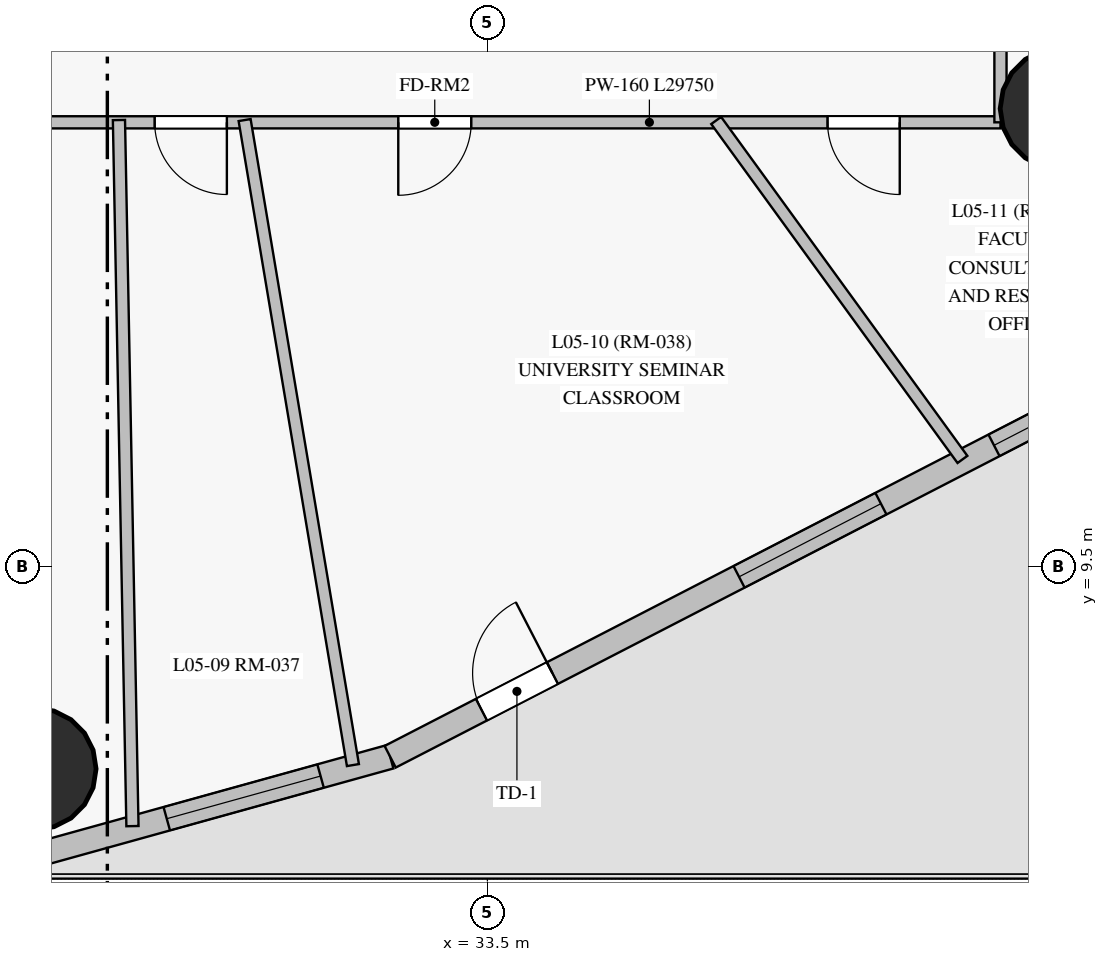
"""IFC4 building model, lengths in metres.
Left out: names, types, materials, properties, quantities, classifications, styles, units other than length and angle.
Written with IfcOpenShell. Run it as: python <this file> out.ifc"""

import sys

from ifc_helpers import new_model, si_unit, direction, frame, frame_2d, origin, origin_with_axes, origin_2d, place, context, subcontext, project, spatial, rectangle, circle, extrude, source, transform, mapped, element, fill, save


model = new_model("IFC4")
c1 = context("Model", 3, precision=1e-05, world=origin(), true_north=direction((0.0, 1.0)))
c2 = subcontext(c1, "Body", "Model", "MODEL_VIEW")
j1 = project(units=[si_unit("LENGTHUNIT", "METRE"), si_unit("PLANEANGLEUNIT", "RADIAN")], contexts=[c1])
p1 = place(None, origin())
s1 = spatial("IfcSite", under=j1, at=p1, CompositionType="ELEMENT")
p2 = place(p1, origin())
s2 = spatial("IfcBuilding", under=s1, at=p2, CompositionType="ELEMENT")
p3 = place(p2, frame((0.0, 0.0, 22.5)))
s3 = spatial("IfcBuildingStorey", under=s2, at=p3, CompositionType="ELEMENT", Elevation=22.5)
m1 = source(origin_with_axes(), c2, "Body", "SweptSolid", [
    extrude(circle(Radius=0.8, at=origin_2d()), origin(), (0.0, 0.0, 1.0), 4.0),
])
for number, where, z_axis, x_axis in (
    (1, (27.552, 6.844, 0.0), (0.0, 0.0, 1.0), (1.0, 0.0, 0.0)),
    (2, (41.046, 15.53, 0.0), (0.0, 0.0, 1.0), (1.0, 0.0, 0.0)),
):
    element("IfcColumn", number, at=place(p3, frame(where, z_axis=z_axis, x_axis=x_axis)), inside=s3, PredefinedType="COLUMN", context=c2, shape_type="MappedRepresentation", body=[
        mapped(m1, transform((0.0, 0.0, 0.0), scale=1.0)),
    ])
p4 = place(p3, frame((16.622, 2.676, 0.0), z_axis=(0.0, 0.0, 1.0), x_axis=(0.963606446226, 0.267324927367, 0.0)))
e3 = element("IfcWall", 3, at=p4, inside=s3, PredefinedType="SOLIDWALL", context=c2, shape_type="SweptSolid", body=[
    extrude(rectangle(XDim=16.188, YDim=0.32, at=frame_2d((8.094, 0.0))), origin(), (0.0, 0.0, 1.0), 3.75),
])
p5 = place(p4, frame((0.587, 0.0, 0.85)))
e4 = element("IfcOpeningElement", 4, at=p5, cuts=e3, PredefinedType="OPENING", context=c2, shape_type="SweptSolid", body=[
    extrude(rectangle(XDim=1.8, YDim=1.85, at=frame_2d((0.9, 0.925))), frame((0.0, 0.17, 0.0), z_axis=(0.0, -1.0, 0.0), x_axis=(1.0, 0.0, 0.0)), (0.0, 0.0, 1.0), 0.34),
])
p6 = place(p4, frame((4.012, 0.0, 0.85)))
e5 = element("IfcOpeningElement", 5, at=p6, cuts=e3, PredefinedType="OPENING", context=c2, shape_type="SweptSolid", body=[
    extrude(rectangle(XDim=2.1, YDim=1.95, at=frame_2d((1.05, 0.975))), frame((0.0, 0.17, 0.0), z_axis=(0.0, -1.0, 0.0), x_axis=(1.0, 0.0, 0.0)), (0.0, 0.0, 1.0), 0.34),
])
p7 = place(p4, frame((7.668, 0.0, 0.85)))
e6 = element("IfcOpeningElement", 6, at=p7, cuts=e3, PredefinedType="OPENING", context=c2, shape_type="SweptSolid", body=[
    extrude(rectangle(XDim=2.1, YDim=1.95, at=frame_2d((1.05, 0.975))), frame((0.0, 0.17, 0.0), z_axis=(0.0, -1.0, 0.0), x_axis=(1.0, 0.0, 0.0)), (0.0, 0.0, 1.0), 0.34),
])
p8 = place(p4, frame((13.138, 0.0, 0.85)))
e7 = element("IfcOpeningElement", 7, at=p8, cuts=e3, PredefinedType="OPENING", context=c2, shape_type="SweptSolid", body=[
    extrude(rectangle(XDim=2.1, YDim=1.95, at=frame_2d((1.05, 0.975))), frame((0.0, 0.17, 0.0), z_axis=(0.0, -1.0, 0.0), x_axis=(1.0, 0.0, 0.0)), (0.0, 0.0, 1.0), 0.34),
])
p9 = place(p3, frame((32.221, 7.003, 0.0), z_axis=(0.0, 0.0, 1.0), x_axis=(0.888779978747, 0.458334102352, 0.0)))
e8 = element("IfcWall", 8, at=p9, inside=s3, PredefinedType="SOLIDWALL", context=c2, shape_type="SweptSolid", body=[
    extrude(rectangle(XDim=11.258, YDim=0.32, at=frame_2d((5.629, 0.0))), origin(), (0.0, 0.0, 1.0), 3.75),
])
p10 = place(p9, frame((5.164, 0.0, 0.85)))
e9 = element("IfcOpeningElement", 9, at=p10, cuts=e8, PredefinedType="OPENING", context=c2, shape_type="SweptSolid", body=[
    extrude(rectangle(XDim=2.1, YDim=1.95, at=frame_2d((1.05, 0.975))), frame((0.0, 0.17, 0.0), z_axis=(0.0, -1.0, 0.0), x_axis=(1.0, 0.0, 0.0)), (0.0, 0.0, 1.0), 0.34),
])
p11 = place(p9, frame((8.938, 0.0, 0.85)))
e10 = element("IfcOpeningElement", 10, at=p11, cuts=e8, PredefinedType="OPENING", context=c2, shape_type="SweptSolid", body=[
    extrude(rectangle(XDim=1.8, YDim=1.85, at=frame_2d((0.9, 0.925))), frame((0.0, 0.17, 0.0), z_axis=(0.0, -1.0, 0.0), x_axis=(1.0, 0.0, 0.0)), (0.0, 0.0, 1.0), 0.34),
])
p12 = place(p9, frame((1.351, 0.0, 0.0)))
e11 = element("IfcOpeningElement", 11, at=p12, cuts=e8, PredefinedType="OPENING", context=c2, shape_type="SweptSolid", body=[
    extrude(rectangle(XDim=1.05, YDim=2.12, at=frame_2d((0.525, 1.06))), frame((0.0, 0.17, 0.0), z_axis=(0.0, -1.0, 0.0), x_axis=(1.0, 0.0, 0.0)), (0.0, 0.0, 1.0), 0.34),
])
p13 = place(p3, frame((40.25, 15.35, 0.0), z_axis=(0.0, 0.0, 1.0), x_axis=(-1.0, 0.0, 0.0)))
e12 = element("IfcWall", 12, at=p13, inside=s3, PredefinedType="PARTITIONING", context=c2, shape_type="SweptSolid", body=[
    extrude(rectangle(XDim=29.75, YDim=0.16, at=frame_2d((14.875, 0.0))), origin(), (0.0, 0.0, 1.0), 3.1),
])
p14 = place(p13, frame((26.803, 0.0, 0.0)))
e13 = element("IfcOpeningElement", 13, at=p14, cuts=e12, PredefinedType="OPENING", context=c2, shape_type="SweptSolid", body=[
    extrude(rectangle(XDim=0.95, YDim=2.15, at=frame_2d((0.475, 1.075))), frame((0.0, 0.09, 0.0), z_axis=(0.0, -1.0, 0.0), x_axis=(1.0, 0.0, 0.0)), (0.0, 0.0, 1.0), 0.18),
])
p15 = place(p13, frame((23.18, 0.0, 0.0)))
e14 = element("IfcOpeningElement", 14, at=p15, cuts=e12, PredefinedType="OPENING", context=c2, shape_type="SweptSolid", body=[
    extrude(rectangle(XDim=0.95, YDim=2.15, at=frame_2d((0.475, 1.075))), frame((0.0, 0.09, 0.0), z_axis=(0.0, -1.0, 0.0), x_axis=(1.0, 0.0, 0.0)), (0.0, 0.0, 1.0), 0.18),
])
p16 = place(p13, frame((21.097, 0.0, 0.0)))
e15 = element("IfcOpeningElement", 15, at=p16, cuts=e12, PredefinedType="OPENING", context=c2, shape_type="SweptSolid", body=[
    extrude(rectangle(XDim=0.95, YDim=2.15, at=frame_2d((0.475, 1.075))), frame((0.0, 0.09, 0.0), z_axis=(0.0, -1.0, 0.0), x_axis=(1.0, 0.0, 0.0)), (0.0, 0.0, 1.0), 0.18),
])
p17 = place(p13, frame((18.772, 0.0, 0.0)))
e16 = element("IfcOpeningElement", 16, at=p17, cuts=e12, PredefinedType="OPENING", context=c2, shape_type="SweptSolid", body=[
    extrude(rectangle(XDim=0.95, YDim=2.15, at=frame_2d((0.475, 1.075))), frame((0.0, 0.09, 0.0), z_axis=(0.0, -1.0, 0.0), x_axis=(1.0, 0.0, 0.0)), (0.0, 0.0, 1.0), 0.18),
])
p18 = place(p13, frame((16.558, 0.0, 0.0)))
e17 = element("IfcOpeningElement", 17, at=p18, cuts=e12, PredefinedType="OPENING", context=c2, shape_type="SweptSolid", body=[
    extrude(rectangle(XDim=0.86, YDim=2.1, at=frame_2d((0.43, 1.05))), frame((0.0, 0.09, 0.0), z_axis=(0.0, -1.0, 0.0), x_axis=(1.0, 0.0, 0.0)), (0.0, 0.0, 1.0), 0.18),
])
p19 = place(p13, frame((14.4, 0.0, 0.0)))
e18 = element("IfcOpeningElement", 18, at=p19, cuts=e12, PredefinedType="OPENING", context=c2, shape_type="SweptSolid", body=[
    extrude(rectangle(XDim=0.95, YDim=2.15, at=frame_2d((0.475, 1.075))), frame((0.0, 0.09, 0.0), z_axis=(0.0, -1.0, 0.0), x_axis=(1.0, 0.0, 0.0)), (0.0, 0.0, 1.0), 0.18),
])
p20 = place(p13, frame((10.177, 0.0, 0.0)))
e19 = element("IfcOpeningElement", 19, at=p20, cuts=e12, PredefinedType="OPENING", context=c2, shape_type="SweptSolid", body=[
    extrude(rectangle(XDim=0.95, YDim=2.15, at=frame_2d((0.475, 1.075))), frame((0.0, 0.09, 0.0), z_axis=(0.0, -1.0, 0.0), x_axis=(1.0, 0.0, 0.0)), (0.0, 0.0, 1.0), 0.18),
])
p21 = place(p13, frame((6.962, 0.0, 0.0)))
e20 = element("IfcOpeningElement", 20, at=p21, cuts=e12, PredefinedType="OPENING", context=c2, shape_type="SweptSolid", body=[
    extrude(rectangle(XDim=0.96, YDim=2.15, at=frame_2d((0.48, 1.075))), frame((0.0, 0.09, 0.0), z_axis=(0.0, -1.0, 0.0), x_axis=(1.0, 0.0, 0.0)), (0.0, 0.0, 1.0), 0.18),
])
p22 = place(p13, frame((1.325, 0.0, 0.0)))
e21 = element("IfcOpeningElement", 21, at=p22, cuts=e12, PredefinedType="OPENING", context=c2, shape_type="SweptSolid", body=[
    extrude(rectangle(XDim=0.95, YDim=2.15, at=frame_2d((0.475, 1.075))), frame((0.0, 0.09, 0.0), z_axis=(0.0, -1.0, 0.0), x_axis=(1.0, 0.0, 0.0)), (0.0, 0.0, 1.0), 0.18),
])
p23 = place(p3, frame((40.25, 37.65, 0.0), z_axis=(0.0, 0.0, 1.0), x_axis=(0.0, -1.0, 0.0)))
e22 = element("IfcWall", 22, at=p23, inside=s3, PredefinedType="PARTITIONING", context=c2, shape_type="SweptSolid", body=[
    extrude(rectangle(XDim=22.3, YDim=0.16, at=frame_2d((11.15, 0.0))), origin(), (0.0, 0.0, 1.0), 3.15),
])
p24 = place(p23, frame((16.25, 0.0, 0.0)))
e23 = element("IfcOpeningElement", 23, at=p24, cuts=e22, PredefinedType="OPENING", context=c2, shape_type="SweptSolid", body=[
    extrude(rectangle(XDim=0.95, YDim=2.15, at=frame_2d((0.475, 1.075))), frame((0.0, 0.09, 0.0), z_axis=(0.0, -1.0, 0.0), x_axis=(1.0, 0.0, 0.0)), (0.0, 0.0, 1.0), 0.18),
])
p25 = place(p23, frame((14.06, 0.0, 0.0)))
e24 = element("IfcOpeningElement", 24, at=p25, cuts=e22, PredefinedType="OPENING", context=c2, shape_type="SweptSolid", body=[
    extrude(rectangle(XDim=0.96, YDim=2.15, at=frame_2d((0.48, 1.075))), frame((0.0, 0.09, 0.0), z_axis=(0.0, -1.0, 0.0), x_axis=(1.0, 0.0, 0.0)), (0.0, 0.0, 1.0), 0.18),
])
p26 = place(p23, frame((12.235, 0.0, 0.0)))
e25 = element("IfcOpeningElement", 25, at=p26, cuts=e22, PredefinedType="OPENING", context=c2, shape_type="SweptSolid", body=[
    extrude(rectangle(XDim=0.95, YDim=2.15, at=frame_2d((0.475, 1.075))), frame((0.0, 0.09, 0.0), z_axis=(0.0, -1.0, 0.0), x_axis=(1.0, 0.0, 0.0)), (0.0, 0.0, 1.0), 0.18),
])
p27 = place(p23, frame((4.385, 0.0, 0.0)))
e26 = element("IfcOpeningElement", 26, at=p27, cuts=e22, PredefinedType="OPENING", context=c2, shape_type="SweptSolid", body=[
    extrude(rectangle(XDim=0.95, YDim=2.15, at=frame_2d((0.475, 1.075))), frame((0.0, 0.09, 0.0), z_axis=(0.0, -1.0, 0.0), x_axis=(1.0, 0.0, 0.0)), (0.0, 0.0, 1.0), 0.18),
])
p28 = place(p23, frame((2.19, 0.0, 0.0)))
e27 = element("IfcOpeningElement", 27, at=p28, cuts=e22, PredefinedType="OPENING", context=c2, shape_type="SweptSolid", body=[
    extrude(rectangle(XDim=0.95, YDim=2.15, at=frame_2d((0.475, 1.075))), frame((0.0, 0.09, 0.0), z_axis=(0.0, -1.0, 0.0), x_axis=(1.0, 0.0, 0.0)), (0.0, 0.0, 1.0), 0.18),
])
p29 = place(p23, frame((17.358, 0.0, 0.0)))
e28 = element("IfcOpeningElement", 28, at=p29, cuts=e22, PredefinedType="OPENING", context=c2, shape_type="SweptSolid", body=[
    extrude(rectangle(XDim=0.95, YDim=2.15, at=frame_2d((0.475, 1.075))), frame((0.0, 0.09, 0.0), z_axis=(0.0, -1.0, 0.0), x_axis=(1.0, 0.0, 0.0)), (0.0, 0.0, 1.0), 0.18),
])
p30 = place(p23, frame((18.489, 0.0, 0.0)))
e29 = element("IfcOpeningElement", 29, at=p30, cuts=e22, PredefinedType="OPENING", context=c2, shape_type="SweptSolid", body=[
    extrude(rectangle(XDim=0.95, YDim=2.15, at=frame_2d((0.475, 1.075))), frame((0.0, 0.09, 0.0), z_axis=(0.0, -1.0, 0.0), x_axis=(1.0, 0.0, 0.0)), (0.0, 0.0, 1.0), 0.18),
])
p31 = place(p23, frame((10.61, 0.0, 0.0)))
e30 = element("IfcOpeningElement", 30, at=p31, cuts=e22, PredefinedType="OPENING", context=c2, shape_type="SweptSolid", body=[
    extrude(rectangle(XDim=0.86, YDim=2.04, at=frame_2d((0.43, 1.02))), frame((0.0, 0.09, 0.0), z_axis=(0.0, -1.0, 0.0), x_axis=(1.0, 0.0, 0.0)), (0.0, 0.0, 1.0), 0.18),
])
p32 = place(p23, frame((8.378, 0.0, 0.0)))
e31 = element("IfcOpeningElement", 31, at=p32, cuts=e22, PredefinedType="OPENING", context=c2, shape_type="SweptSolid", body=[
    extrude(rectangle(XDim=0.86, YDim=2.04, at=frame_2d((0.43, 1.02))), frame((0.0, 0.09, 0.0), z_axis=(0.0, -1.0, 0.0), x_axis=(1.0, 0.0, 0.0)), (0.0, 0.0, 1.0), 0.18),
])
p33 = place(p23, frame((7.144, 0.0, 0.0)))
e32 = element("IfcOpeningElement", 32, at=p33, cuts=e22, PredefinedType="OPENING", context=c2, shape_type="SweptSolid", body=[
    extrude(rectangle(XDim=0.86, YDim=2.04, at=frame_2d((0.43, 1.02))), frame((0.0, 0.09, 0.0), z_axis=(0.0, -1.0, 0.0), x_axis=(1.0, 0.0, 0.0)), (0.0, 0.0, 1.0), 0.18),
])
p34 = place(p3, frame((28.653, 15.38, 0.0), z_axis=(0.0, 0.0, 1.0), x_axis=(0.019130224358, -0.999817000514, 0.0)))
e33 = element("IfcWall", 33, at=p34, inside=s3, PredefinedType="PARTITIONING", context=c2, shape_type="SweptSolid", body=[
    extrude(rectangle(XDim=9.291, YDim=0.16, at=frame_2d((4.646, 0.0))), origin(), (0.0, 0.0, 1.0), 3.75),
])
p35 = place(p3, frame((30.306, 15.38, 0.0), z_axis=(0.0, 0.0, 1.0), x_axis=(0.165558345781, -0.98619999703, 0.0)))
e34 = element("IfcWall", 34, at=p35, inside=s3, PredefinedType="PARTITIONING", context=c2, shape_type="SweptSolid", body=[
    extrude(rectangle(XDim=8.604, YDim=0.16, at=frame_2d((4.302, 0.0))), origin(), (0.0, 0.0, 1.0), 3.75),
])
p36 = place(p3, frame((40.214, 17.761, 0.0), z_axis=(0.0, 0.0, 1.0), x_axis=(0.803997629738, -0.59463250111, 0.0)))
e35 = element("IfcWall", 35, at=p36, inside=s3, PredefinedType="PARTITIONING", context=c2, shape_type="SweptSolid", body=[
    extrude(rectangle(XDim=5.771, YDim=0.16, at=frame_2d((2.885, 0.0))), origin(), (0.0, 0.0, 1.0), 3.75),
])
p37 = place(p3, frame((36.51, 15.374, 0.0), z_axis=(0.0, 0.0, 1.0), x_axis=(0.587834553636, -0.808981172557, 0.0)))
e36 = element("IfcWall", 36, at=p37, inside=s3, PredefinedType="PARTITIONING", context=c2, shape_type="SweptSolid", body=[
    extrude(rectangle(XDim=5.512, YDim=0.16, at=frame_2d((2.756, 0.0))), origin(), (0.0, 0.0, 1.0), 3.75),
])
m2 = source(origin_with_axes(), c2, "Body", "SweptSolid", [
    extrude(rectangle(XDim=2.1, YDim=1.95, at=frame_2d((1.05, 0.975))), frame((0.0, 0.03, 0.0), z_axis=(0.0, -1.0, 0.0), x_axis=(1.0, 0.0, 0.0)), (0.0, 0.0, 1.0), 0.06),
])
p38 = place(p8, origin())
e37 = element("IfcWindow", 37, at=p38, inside=s3, PartitioningType="SINGLE_PANEL", PredefinedType="WINDOW", context=c2, shape_type="MappedRepresentation", body=[
    mapped(m2, transform((0.0, 0.0, 0.0), scale=1.0)),
])
fill(e7, e37)
p39 = place(p10, origin())
e38 = element("IfcWindow", 38, at=p39, inside=s3, PartitioningType="SINGLE_PANEL", PredefinedType="WINDOW", context=c2, shape_type="MappedRepresentation", body=[
    mapped(m2, transform((0.0, 0.0, 0.0), scale=1.0)),
])
fill(e9, e38)
m3 = source(origin_with_axes(), c2, "Body", "SweptSolid", [
    extrude(rectangle(XDim=1.8, YDim=1.85, at=frame_2d((0.9, 0.925))), frame((0.0, 0.03, 0.0), z_axis=(0.0, -1.0, 0.0), x_axis=(1.0, 0.0, 0.0)), (0.0, 0.0, 1.0), 0.06),
])
p40 = place(p11, origin())
e39 = element("IfcWindow", 39, at=p40, inside=s3, PartitioningType="SINGLE_PANEL", PredefinedType="WINDOW", context=c2, shape_type="MappedRepresentation", body=[
    mapped(m3, transform((0.0, 0.0, 0.0), scale=1.0)),
])
fill(e10, e39)
m4 = source(origin_with_axes(), c2, "Body", "SweptSolid", [
    extrude(rectangle(XDim=1.05, YDim=2.12, at=frame_2d((0.525, 1.06))), frame((0.0, 0.025, 0.0), z_axis=(0.0, -1.0, 0.0), x_axis=(1.0, 0.0, 0.0)), (0.0, 0.0, 1.0), 0.05),
])
p41 = place(p12, origin())
e40 = element("IfcDoor", 40, at=p41, inside=s3, OperationType="SINGLE_SWING_RIGHT", PredefinedType="DOOR", context=c2, shape_type="MappedRepresentation", body=[
    mapped(m4, transform((0.0, 0.0, 0.0), scale=1.0)),
])
fill(e11, e40)
m5 = source(origin_with_axes(), c2, "Body", "SweptSolid", [
    extrude(rectangle(XDim=0.95, YDim=2.15, at=frame_2d((0.475, 1.075))), frame((0.0, 0.025, 0.0), z_axis=(0.0, -1.0, 0.0), x_axis=(1.0, 0.0, 0.0)), (0.0, 0.0, 1.0), 0.05),
])
p42 = place(p20, origin())
e41 = element("IfcDoor", 41, at=p42, inside=s3, OperationType="SINGLE_SWING_LEFT", PredefinedType="DOOR", context=c2, shape_type="MappedRepresentation", body=[
    mapped(m5, transform((0.0, 0.0, 0.0), scale=1.0)),
])
fill(e19, e41)
m6 = source(origin_with_axes(), c2, "Body", "SweptSolid", [
    extrude(rectangle(XDim=0.96, YDim=2.15, at=frame_2d((0.48, 1.075))), frame((0.0, 0.025, 0.0), z_axis=(0.0, -1.0, 0.0), x_axis=(1.0, 0.0, 0.0)), (0.0, 0.0, 1.0), 0.05),
])
p43 = place(p21, origin())
e42 = element("IfcDoor", 42, at=p43, inside=s3, OperationType="SINGLE_SWING_RIGHT", PredefinedType="DOOR", context=c2, shape_type="MappedRepresentation", body=[
    mapped(m6, transform((0.0, 0.0, 0.0), scale=1.0)),
])
fill(e20, e42)
p44 = place(p22, origin())
e43 = element("IfcDoor", 43, at=p44, inside=s3, OperationType="SINGLE_SWING_LEFT", PredefinedType="DOOR", context=c2, shape_type="MappedRepresentation", body=[
    mapped(m5, transform((0.0, 0.0, 0.0), scale=1.0)),
])
fill(e21, e43)
save(model, sys.argv[1])
